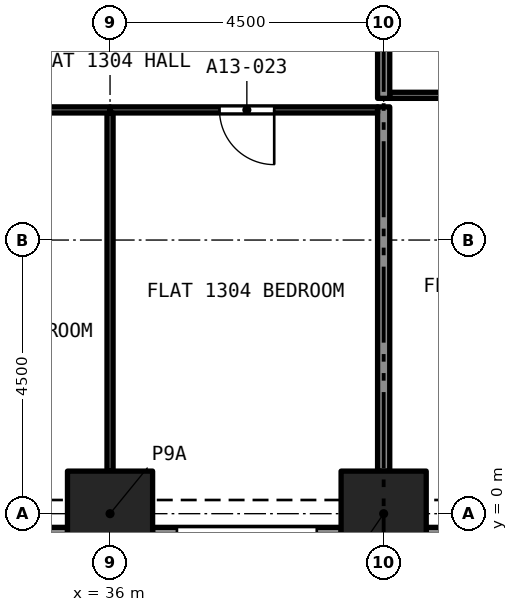
"""IFC4 building model, lengths in metres.
Left out: names, types, materials, properties, quantities, classifications, styles, units other than length and angle.
Written with IfcOpenShell. Run it as: python <this file> out.ifc"""

import sys

from ifc_helpers import new_model, si_unit, direction, frame, frame_2d, origin, origin_2d, place, context, subcontext, project, spatial, rectangle, extrude, element, fill, save


model = new_model("IFC4")
c1 = context("Model", 3, precision=1e-05, world=origin(), true_north=direction((0.0, 1.0)))
c2 = subcontext(c1, "Body", "Model", "MODEL_VIEW")
j1 = project(units=[si_unit("LENGTHUNIT", "METRE"), si_unit("PLANEANGLEUNIT", "RADIAN")], contexts=[c1])
p1 = place(None, origin())
s1 = spatial("IfcSite", under=j1, at=p1, CompositionType="ELEMENT")
p2 = place(p1, origin())
s2 = spatial("IfcBuilding", under=s1, at=p2, CompositionType="ELEMENT")
p3 = place(p2, frame((0.0, 0.0, 52.8)))
s3 = spatial("IfcBuildingStorey", under=s2, at=p3, CompositionType="ELEMENT", Elevation=52.8)
for number, where, z_axis, x_axis in (
    (1, (36.0, 0.0, 0.0), (0.0, 0.0, 1.0), (1.0, 0.0, 0.0)),
    (2, (40.5, 0.0, 0.0), (0.0, 0.0, 1.0), (1.0, 0.0, 0.0)),
):
    element("IfcColumn", number, at=place(p3, frame(where, z_axis=z_axis, x_axis=x_axis)), inside=s3, PredefinedType="COLUMN", context=c2, shape_type="SweptSolid", body=[
        extrude(rectangle(XDim=1.4, YDim=1.4, at=origin_2d()), origin(), (0.0, 0.0, 1.0), 3.2),
    ])
p4 = place(p3, frame((35.3, -0.375, 0.0), z_axis=(0.0, 0.0, 1.0), x_axis=(-1.0, 0.0, 0.0)))
e3 = element("IfcWall", 3, at=p4, inside=s3, PredefinedType="SOLIDWALL", context=c2, shape_type="SweptSolid", body=[
    extrude(rectangle(XDim=3.1, YDim=0.3, at=frame_2d((1.55, 0.0))), origin(), (0.0, 0.0, 1.0), 3.2),
])
p5 = place(p4, frame((0.4, 0.0, 0.45)))
e4 = element("IfcOpeningElement", 4, at=p5, cuts=e3, PredefinedType="OPENING", context=c2, shape_type="SweptSolid", body=[
    extrude(rectangle(XDim=2.3, YDim=1.95, at=frame_2d((1.15, 0.975))), frame((0.0, 0.16, 0.0), z_axis=(0.0, -1.0, 0.0), x_axis=(1.0, 0.0, 0.0)), (0.0, 0.0, 1.0), 0.32),
])
p6 = place(p3, frame((39.8, -0.375, 0.0), z_axis=(0.0, 0.0, 1.0), x_axis=(-1.0, 0.0, 0.0)))
e5 = element("IfcWall", 5, at=p6, inside=s3, PredefinedType="SOLIDWALL", context=c2, shape_type="SweptSolid", body=[
    extrude(rectangle(XDim=3.1, YDim=0.3, at=frame_2d((1.55, 0.0))), origin(), (0.0, 0.0, 1.0), 3.2),
])
p7 = place(p6, frame((0.4, 0.0, 0.45)))
e6 = element("IfcOpeningElement", 6, at=p7, cuts=e5, PredefinedType="OPENING", context=c2, shape_type="SweptSolid", body=[
    extrude(rectangle(XDim=2.3, YDim=1.95, at=frame_2d((1.15, 0.975))), frame((0.0, 0.16, 0.0), z_axis=(0.0, -1.0, 0.0), x_axis=(1.0, 0.0, 0.0)), (0.0, 0.0, 1.0), 0.32),
])
p8 = place(p3, frame((44.3, -0.375, 0.0), z_axis=(0.0, 0.0, 1.0), x_axis=(-1.0, 0.0, 0.0)))
e7 = element("IfcWall", 7, at=p8, inside=s3, PredefinedType="SOLIDWALL", context=c2, shape_type="SweptSolid", body=[
    extrude(rectangle(XDim=3.1, YDim=0.3, at=frame_2d((1.55, 0.0))), origin(), (0.0, 0.0, 1.0), 3.2),
])
p9 = place(p8, frame((0.4, 0.0, 0.45)))
e8 = element("IfcOpeningElement", 8, at=p9, cuts=e7, PredefinedType="OPENING", context=c2, shape_type="SweptSolid", body=[
    extrude(rectangle(XDim=2.3, YDim=1.95, at=frame_2d((1.15, 0.975))), frame((0.0, 0.16, 0.0), z_axis=(0.0, -1.0, 0.0), x_axis=(1.0, 0.0, 0.0)), (0.0, 0.0, 1.0), 0.32),
])
p10 = place(p3, frame((44.95, 6.88, 0.0), z_axis=(0.0, 0.0, 1.0), x_axis=(-1.0, 0.0, 0.0)))
e9 = element("IfcWall", 9, at=p10, inside=s3, PredefinedType="PARTITIONING", context=c2, shape_type="SweptSolid", body=[
    extrude(rectangle(XDim=4.35, YDim=0.1, at=frame_2d((2.175, 0.0))), origin(), (0.0, 0.0, 1.0), 2.9),
])
p11 = place(p10, frame((1.75, 0.0, 0.0)))
e10 = element("IfcOpeningElement", 10, at=p11, cuts=e9, PredefinedType="OPENING", context=c2, shape_type="SweptSolid", body=[
    extrude(rectangle(XDim=0.9, YDim=2.1, at=frame_2d((0.45, 1.05))), frame((0.0, 0.06, 0.0), z_axis=(0.0, -1.0, 0.0), x_axis=(1.0, 0.0, 0.0)), (0.0, 0.0, 1.0), 0.12),
])
p12 = place(p3, frame((40.5, 0.7, 0.0), z_axis=(0.0, 0.0, 1.0), x_axis=(0.0, 1.0, 0.0)))
e11 = element("IfcWall", 11, at=p12, inside=s3, PredefinedType="PARTITIONING", context=c2, shape_type="SweptSolid", body=[
    extrude(rectangle(XDim=5.99, YDim=0.2, at=frame_2d((2.995, 0.0))), origin(), (0.0, 0.0, 1.0), 2.9),
])
p13 = place(p3, frame((40.5, 6.83, 0.0), z_axis=(0.0, 0.0, 1.0), x_axis=(0.0, 1.0, 0.0)))
e12 = element("IfcWall", 12, at=p13, inside=s3, PredefinedType="PARTITIONING", context=c2, shape_type="SweptSolid", body=[
    extrude(rectangle(XDim=7.295, YDim=0.2, at=frame_2d((3.647, 0.0))), origin(), (0.0, 0.0, 1.0), 2.9),
])
p14 = place(p3, frame((40.4, 6.64, 0.0), z_axis=(0.0, 0.0, 1.0), x_axis=(-1.0, 0.0, 0.0)))
e13 = element("IfcWall", 13, at=p14, inside=s3, PredefinedType="PARTITIONING", context=c2, shape_type="SweptSolid", body=[
    extrude(rectangle(XDim=4.4, YDim=0.1, at=frame_2d((2.2, 0.0))), origin(), (0.0, 0.0, 1.0), 2.9),
])
p15 = place(p14, frame((1.7, 0.0, 0.0)))
e14 = element("IfcOpeningElement", 14, at=p15, cuts=e13, PredefinedType="OPENING", context=c2, shape_type="SweptSolid", body=[
    extrude(rectangle(XDim=0.9, YDim=2.1, at=frame_2d((0.45, 1.05))), frame((0.0, 0.06, 0.0), z_axis=(0.0, -1.0, 0.0), x_axis=(1.0, 0.0, 0.0)), (0.0, 0.0, 1.0), 0.12),
])
p16 = place(p3, frame((36.0, 0.7, 0.0), z_axis=(0.0, 0.0, 1.0), x_axis=(0.0, 1.0, 0.0)))
e15 = element("IfcWall", 15, at=p16, inside=s3, PredefinedType="PARTITIONING", context=c2, shape_type="SweptSolid", body=[
    extrude(rectangle(XDim=5.89, YDim=0.1, at=frame_2d((2.945, 0.0))), origin(), (0.0, 0.0, 1.0), 2.9),
])
p17 = place(p3, frame((36.0, 6.64, 0.0), z_axis=(0.0, 0.0, 1.0), x_axis=(-1.0, 0.0, 0.0)))
e16 = element("IfcWall", 16, at=p17, inside=s3, PredefinedType="PARTITIONING", context=c2, shape_type="SweptSolid", body=[
    extrude(rectangle(XDim=4.375, YDim=0.1, at=frame_2d((2.188, 0.0))), origin(), (0.0, 0.0, 1.0), 2.9),
])
p18 = place(p17, frame((1.75, 0.0, 0.0)))
e17 = element("IfcOpeningElement", 17, at=p18, cuts=e16, PredefinedType="OPENING", context=c2, shape_type="SweptSolid", body=[
    extrude(rectangle(XDim=1.0, YDim=2.1, at=frame_2d((0.5, 1.05))), frame((0.0, 0.06, 0.0), z_axis=(0.0, -1.0, 0.0), x_axis=(1.0, 0.0, 0.0)), (0.0, 0.0, 1.0), 0.12),
])
p19 = place(p15, origin())
e18 = element("IfcDoor", 18, at=p19, inside=s3, OperationType="SINGLE_SWING_LEFT", PredefinedType="DOOR", context=c2, shape_type="SweptSolid", body=[
    extrude(rectangle(XDim=0.9, YDim=2.1, at=frame_2d((0.45, 1.05))), frame((0.0, 0.025, 0.0), z_axis=(0.0, -1.0, 0.0), x_axis=(1.0, 0.0, 0.0)), (0.0, 0.0, 1.0), 0.05),
])
fill(e14, e18)
save(model, sys.argv[1])
